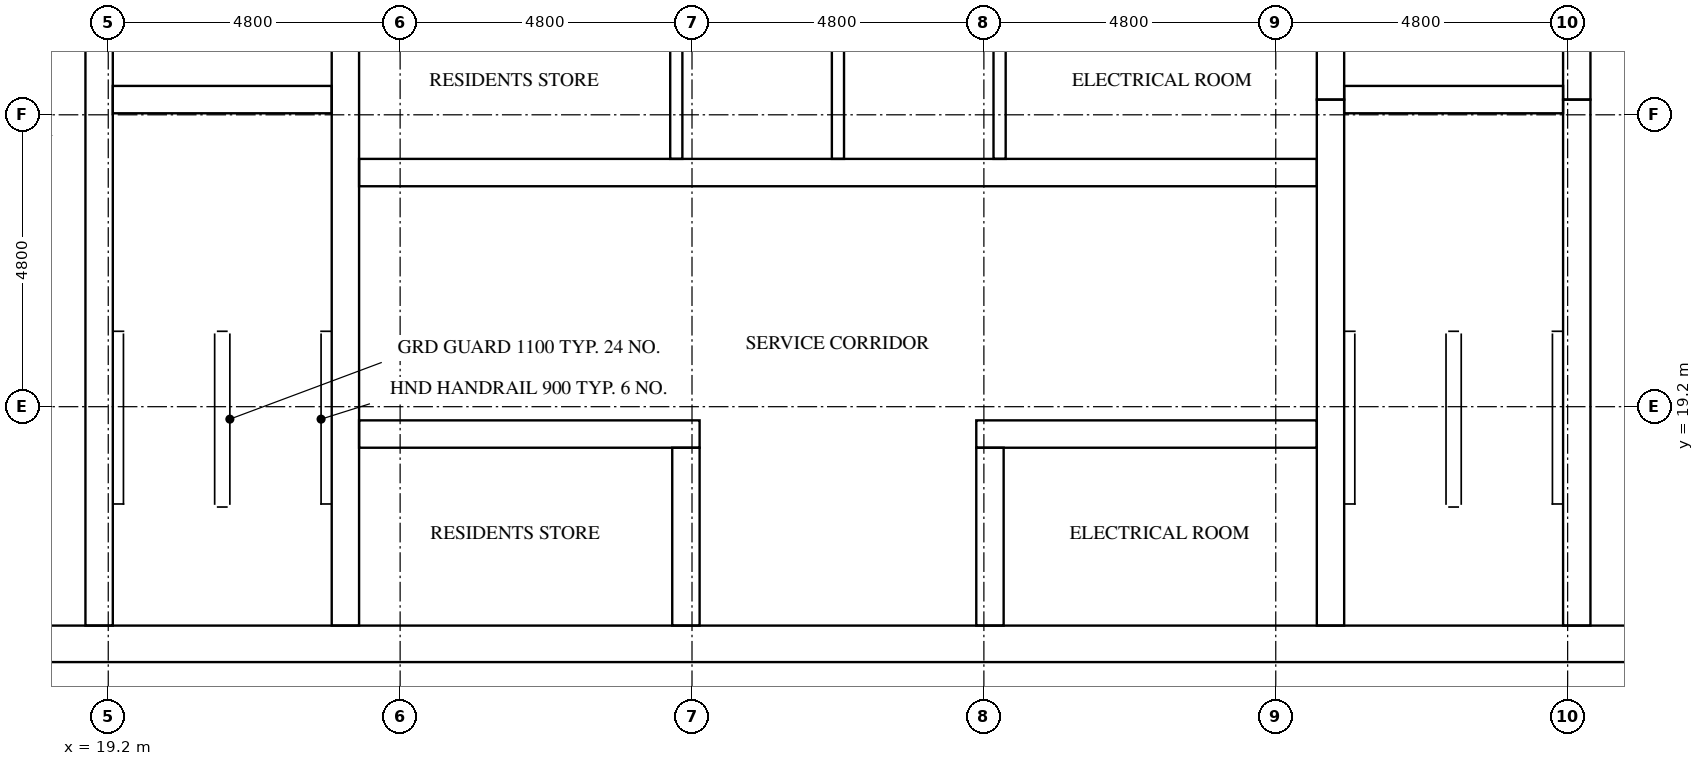
"""IFC4 building model, lengths in metres.
Left out: names, types, materials, properties, quantities, classifications, styles, units other than length and angle.
Written with IfcOpenShell. Run it as: python <this file> out.ifc"""

import sys

from ifc_helpers import new_model, si_unit, direction, frame, frame_2d, origin, place, context, subcontext, project, spatial, rectangle, extrude, element, fill, save


model = new_model("IFC4")
c1 = context("Model", 3, precision=1e-05, world=origin(), true_north=direction((0.0, 1.0)))
c2 = subcontext(c1, "Body", "Model", "MODEL_VIEW")
j1 = project(units=[si_unit("LENGTHUNIT", "METRE"), si_unit("PLANEANGLEUNIT", "RADIAN")], contexts=[c1])
p1 = place(None, origin())
s1 = spatial("IfcSite", under=j1, at=p1, CompositionType="ELEMENT")
p2 = place(p1, origin())
s2 = spatial("IfcBuilding", under=s1, at=p2, CompositionType="ELEMENT")
p3 = place(p2, frame((0.0, 0.0, 252.7)))
s3 = spatial("IfcBuildingStorey", under=s2, at=p3, CompositionType="ELEMENT", Elevation=252.7)
p4 = place(p3, frame((15.0, 15.3, 0.0), z_axis=(0.0, 0.0, 1.0), x_axis=(1.0, 0.0, 0.0)))
e1 = element("IfcWall", 1, at=p4, inside=s3, PredefinedType="SHEAR", context=c2, shape_type="SweptSolid", body=[
    extrude(rectangle(XDim=32.4, YDim=0.6, at=frame_2d((16.2, 0.0))), origin(), (0.0, 0.0, 1.0), 3.2),
])
p5 = place(p4, frame((15.3, 0.0, 0.0)))
e2 = element("IfcOpeningElement", 2, at=p5, cuts=e1, PredefinedType="OPENING", context=c2, shape_type="SweptSolid", body=[
    extrude(rectangle(XDim=1.8, YDim=2.1, at=frame_2d((0.9, 1.05))), frame((0.0, 0.31, 0.0), z_axis=(0.0, -1.0, 0.0), x_axis=(1.0, 0.0, 0.0)), (0.0, 0.0, 1.0), 0.62),
])
p6 = place(p3, frame((19.05, 15.6, 0.0), z_axis=(0.0, 0.0, 1.0), x_axis=(0.0, 1.0, 0.0)))
e3 = element("IfcWall", 3, at=p6, inside=s3, PredefinedType="SHEAR", context=c2, shape_type="SweptSolid", body=[
    extrude(rectangle(XDim=15.425, YDim=0.45, at=frame_2d((7.712, 0.0))), origin(), (0.0, 0.0, 1.0), 3.2),
])
p7 = place(p6, frame((9.85, 0.0, 0.0)))
e4 = element("IfcOpeningElement", 4, at=p7, cuts=e3, PredefinedType="OPENING", context=c2, shape_type="SweptSolid", body=[
    extrude(rectangle(XDim=1.1, YDim=2.1, at=frame_2d((0.55, 1.05))), frame((0.0, 0.235, 0.0), z_axis=(0.0, -1.0, 0.0), x_axis=(1.0, 0.0, 0.0)), (0.0, 0.0, 1.0), 0.47),
])
p8 = place(p6, frame((13.35, 0.0, 0.0)))
e5 = element("IfcOpeningElement", 5, at=p8, cuts=e3, PredefinedType="OPENING", context=c2, shape_type="SweptSolid", body=[
    extrude(rectangle(XDim=1.1, YDim=2.1, at=frame_2d((0.55, 1.05))), frame((0.0, 0.235, 0.0), z_axis=(0.0, -1.0, 0.0), x_axis=(1.0, 0.0, 0.0)), (0.0, 0.0, 1.0), 0.47),
])
p9 = place(p6, frame((0.6, 0.0, 0.0)))
e6 = element("IfcOpeningElement", 6, at=p9, cuts=e3, PredefinedType="OPENING", context=c2, shape_type="SweptSolid", body=[
    extrude(rectangle(XDim=1.2, YDim=2.1, at=frame_2d((0.6, 1.05))), frame((0.0, 0.235, 0.0), z_axis=(0.0, -1.0, 0.0), x_axis=(1.0, 0.0, 0.0)), (0.0, 0.0, 1.0), 0.47),
])
p10 = place(p3, frame((23.1, 15.6, 0.0), z_axis=(0.0, 0.0, 1.0), x_axis=(0.0, 1.0, 0.0)))
e7 = element("IfcWall", 7, at=p10, inside=s3, PredefinedType="SHEAR", context=c2, shape_type="SweptSolid", body=[
    extrude(rectangle(XDim=21.6, YDim=0.45, at=frame_2d((10.8, 0.0))), origin(), (0.0, 0.0, 1.0), 3.2),
])
p11 = place(p3, frame((39.3, 15.6, 0.0), z_axis=(0.0, 0.0, 1.0), x_axis=(0.0, 1.0, 0.0)))
e8 = element("IfcWall", 8, at=p11, inside=s3, PredefinedType="SHEAR", context=c2, shape_type="SweptSolid", body=[
    extrude(rectangle(XDim=8.65, YDim=0.45, at=frame_2d((4.325, 0.0))), origin(), (0.0, 0.0, 1.0), 3.2),
])
p12 = place(p3, frame((39.3, 24.25, 0.0), z_axis=(0.0, 0.0, 1.0), x_axis=(0.0, 1.0, 0.0)))
e9 = element("IfcWall", 9, at=p12, inside=s3, PredefinedType="SHEAR", context=c2, shape_type="SweptSolid", body=[
    extrude(rectangle(XDim=3.5, YDim=0.45, at=frame_2d((1.75, 0.0))), origin(), (0.0, 0.0, 1.0), 3.2),
])
p13 = place(p3, frame((43.35, 15.6, 0.0), z_axis=(0.0, 0.0, 1.0), x_axis=(0.0, 1.0, 0.0)))
e10 = element("IfcWall", 10, at=p13, inside=s3, PredefinedType="SHEAR", context=c2, shape_type="SweptSolid", body=[
    extrude(rectangle(XDim=8.65, YDim=0.45, at=frame_2d((4.325, 0.0))), origin(), (0.0, 0.0, 1.0), 3.2),
])
p14 = place(p13, frame((0.6, 0.0, 0.0)))
e11 = element("IfcOpeningElement", 11, at=p14, cuts=e10, PredefinedType="OPENING", context=c2, shape_type="SweptSolid", body=[
    extrude(rectangle(XDim=1.2, YDim=2.1, at=frame_2d((0.6, 1.05))), frame((0.0, 0.235, 0.0), z_axis=(0.0, -1.0, 0.0), x_axis=(1.0, 0.0, 0.0)), (0.0, 0.0, 1.0), 0.47),
])
p15 = place(p3, frame((43.35, 24.25, 0.0), z_axis=(0.0, 0.0, 1.0), x_axis=(0.0, 1.0, 0.0)))
e12 = element("IfcWall", 12, at=p15, inside=s3, PredefinedType="SHEAR", context=c2, shape_type="SweptSolid", body=[
    extrude(rectangle(XDim=3.5, YDim=0.45, at=frame_2d((1.75, 0.0))), origin(), (0.0, 0.0, 1.0), 3.2),
])
p16 = place(p15, frame((1.2, 0.0, 0.0)))
e13 = element("IfcOpeningElement", 13, at=p16, cuts=e12, PredefinedType="OPENING", context=c2, shape_type="SweptSolid", body=[
    extrude(rectangle(XDim=1.1, YDim=2.1, at=frame_2d((0.55, 1.05))), frame((0.0, 0.235, 0.0), z_axis=(0.0, -1.0, 0.0), x_axis=(1.0, 0.0, 0.0)), (0.0, 0.0, 1.0), 0.47),
])
for number, where, z_axis, x_axis in (
    (14, (19.275, 24.25, 0.0), (0.0, 0.0, 1.0), (1.0, 0.0, 0.0)),
    (15, (39.525, 24.25, 0.0), (0.0, 0.0, 1.0), (1.0, 0.0, 0.0)),
):
    element("IfcWall", number, at=place(p3, frame(where, z_axis=z_axis, x_axis=x_axis)), inside=s3, PredefinedType="SHEAR", context=c2, shape_type="SweptSolid", body=[
        extrude(rectangle(XDim=3.6, YDim=0.45, at=frame_2d((1.8, 0.0))), origin(), (0.0, 0.0, 1.0), 3.2),
    ])
p17 = place(p3, frame((23.325, 18.75, 0.0), z_axis=(0.0, 0.0, 1.0), x_axis=(1.0, 0.0, 0.0)))
e16 = element("IfcWall", 16, at=p17, inside=s3, PredefinedType="SHEAR", context=c2, shape_type="SweptSolid", body=[
    extrude(rectangle(XDim=5.6, YDim=0.45, at=frame_2d((2.8, 0.0))), origin(), (0.0, 0.0, 1.0), 3.2),
])
p18 = place(p17, frame((2.075, 0.0, 0.0)))
e17 = element("IfcOpeningElement", 17, at=p18, cuts=e16, PredefinedType="OPENING", context=c2, shape_type="SweptSolid", body=[
    extrude(rectangle(XDim=1.0, YDim=2.1, at=frame_2d((0.5, 1.05))), frame((0.0, 0.235, 0.0), z_axis=(0.0, -1.0, 0.0), x_axis=(1.0, 0.0, 0.0)), (0.0, 0.0, 1.0), 0.47),
])
p19 = place(p3, frame((33.475, 18.75, 0.0), z_axis=(0.0, 0.0, 1.0), x_axis=(1.0, 0.0, 0.0)))
e18 = element("IfcWall", 18, at=p19, inside=s3, PredefinedType="SHEAR", context=c2, shape_type="SweptSolid", body=[
    extrude(rectangle(XDim=5.6, YDim=0.45, at=frame_2d((2.8, 0.0))), origin(), (0.0, 0.0, 1.0), 3.2),
])
p20 = place(p19, frame((2.525, 0.0, 0.0)))
e19 = element("IfcOpeningElement", 19, at=p20, cuts=e18, PredefinedType="OPENING", context=c2, shape_type="SweptSolid", body=[
    extrude(rectangle(XDim=1.0, YDim=2.1, at=frame_2d((0.5, 1.05))), frame((0.0, 0.235, 0.0), z_axis=(0.0, -1.0, 0.0), x_axis=(1.0, 0.0, 0.0)), (0.0, 0.0, 1.0), 0.47),
])
p21 = place(p3, frame((23.325, 23.05, 0.0), z_axis=(0.0, 0.0, 1.0), x_axis=(1.0, 0.0, 0.0)))
e20 = element("IfcWall", 20, at=p21, inside=s3, PredefinedType="SHEAR", context=c2, shape_type="SweptSolid", body=[
    extrude(rectangle(XDim=15.75, YDim=0.45, at=frame_2d((7.875, 0.0))), origin(), (0.0, 0.0, 1.0), 3.2),
])
p22 = place(p21, frame((2.058, 0.0, 0.0)))
e21 = element("IfcOpeningElement", 21, at=p22, cuts=e20, PredefinedType="OPENING", context=c2, shape_type="SweptSolid", body=[
    extrude(rectangle(XDim=1.0, YDim=2.1, at=frame_2d((0.5, 1.05))), frame((0.0, 0.235, 0.0), z_axis=(0.0, -1.0, 0.0), x_axis=(1.0, 0.0, 0.0)), (0.0, 0.0, 1.0), 0.47),
])
p23 = place(p21, frame((12.692, 0.0, 0.0)))
e22 = element("IfcOpeningElement", 22, at=p23, cuts=e20, PredefinedType="OPENING", context=c2, shape_type="SweptSolid", body=[
    extrude(rectangle(XDim=1.0, YDim=2.1, at=frame_2d((0.5, 1.05))), frame((0.0, 0.235, 0.0), z_axis=(0.0, -1.0, 0.0), x_axis=(1.0, 0.0, 0.0)), (0.0, 0.0, 1.0), 0.47),
])
for number, where, z_axis, x_axis in (
    (23, (28.7, 15.6, 0.0), (0.0, 0.0, 1.0), (0.0, 1.0, 0.0)),
    (24, (33.7, 15.6, 0.0), (0.0, 0.0, 1.0), (0.0, 1.0, 0.0)),
):
    element("IfcWall", number, at=place(p3, frame(where, z_axis=z_axis, x_axis=x_axis)), inside=s3, PredefinedType="SHEAR", context=c2, shape_type="SweptSolid", body=[
        extrude(rectangle(XDim=2.925, YDim=0.45, at=frame_2d((1.462, 0.0))), origin(), (0.0, 0.0, 1.0), 3.2),
    ])
for number, where, z_axis, x_axis in (
    (25, (28.542, 23.275, 0.0), (0.0, 0.0, 1.0), (0.0, 1.0, 0.0)),
    (26, (31.2, 23.275, 0.0), (0.0, 0.0, 1.0), (0.0, 1.0, 0.0)),
    (27, (33.858, 23.275, 0.0), (0.0, 0.0, 1.0), (0.0, 1.0, 0.0)),
):
    element("IfcWall", number, at=place(p3, frame(where, z_axis=z_axis, x_axis=x_axis)), inside=s3, PredefinedType="SOLIDWALL", context=c2, shape_type="SweptSolid", body=[
        extrude(rectangle(XDim=2.65, YDim=0.2, at=frame_2d((1.325, 0.0))), origin(), (0.0, 0.0, 1.0), 3.2),
    ])
p24 = place(p9, frame((1.2, 0.0, 0.0), z_axis=(0.0, 0.0, 1.0), x_axis=(-1.0, 0.0, 0.0)))
e28 = element("IfcDoor", 28, at=p24, inside=s3, OperationType="SINGLE_SWING_RIGHT", PredefinedType="DOOR", context=c2, shape_type="SweptSolid", body=[
    extrude(rectangle(XDim=1.2, YDim=2.1, at=frame_2d((0.6, 1.05))), frame((0.0, 0.025, 0.0), z_axis=(0.0, -1.0, 0.0), x_axis=(1.0, 0.0, 0.0)), (0.0, 0.0, 1.0), 0.05),
])
fill(e6, e28)
p25 = place(p14, origin())
e29 = element("IfcDoor", 29, at=p25, inside=s3, OperationType="SINGLE_SWING_LEFT", PredefinedType="DOOR", context=c2, shape_type="SweptSolid", body=[
    extrude(rectangle(XDim=1.2, YDim=2.1, at=frame_2d((0.6, 1.05))), frame((0.0, 0.025, 0.0), z_axis=(0.0, -1.0, 0.0), x_axis=(1.0, 0.0, 0.0)), (0.0, 0.0, 1.0), 0.05),
])
fill(e11, e29)
p26 = place(p5, frame((1.8, 0.0, 0.0), z_axis=(0.0, 0.0, 1.0), x_axis=(-1.0, 0.0, 0.0)))
e30 = element("IfcDoor", 30, at=p26, inside=s3, OperationType="DOUBLE_DOOR_SINGLE_SWING", PredefinedType="DOOR", context=c2, shape_type="SweptSolid", body=[
    extrude(rectangle(XDim=1.8, YDim=2.1, at=frame_2d((0.9, 1.05))), frame((0.0, 0.025, 0.0), z_axis=(0.0, -1.0, 0.0), x_axis=(1.0, 0.0, 0.0)), (0.0, 0.0, 1.0), 0.05),
])
fill(e2, e30)
p27 = place(p22, frame((1.0, 0.0, 0.0), z_axis=(0.0, 0.0, 1.0), x_axis=(-1.0, 0.0, 0.0)))
e31 = element("IfcDoor", 31, at=p27, inside=s3, OperationType="SINGLE_SWING_LEFT", PredefinedType="DOOR", context=c2, shape_type="SweptSolid", body=[
    extrude(rectangle(XDim=1.0, YDim=2.1, at=frame_2d((0.5, 1.05))), frame((0.0, 0.025, 0.0), z_axis=(0.0, -1.0, 0.0), x_axis=(1.0, 0.0, 0.0)), (0.0, 0.0, 1.0), 0.05),
])
fill(e21, e31)
p28 = place(p23, frame((1.0, 0.0, 0.0), z_axis=(0.0, 0.0, 1.0), x_axis=(-1.0, 0.0, 0.0)))
e32 = element("IfcDoor", 32, at=p28, inside=s3, OperationType="SINGLE_SWING_RIGHT", PredefinedType="DOOR", context=c2, shape_type="SweptSolid", body=[
    extrude(rectangle(XDim=1.0, YDim=2.1, at=frame_2d((0.5, 1.05))), frame((0.0, 0.025, 0.0), z_axis=(0.0, -1.0, 0.0), x_axis=(1.0, 0.0, 0.0)), (0.0, 0.0, 1.0), 0.05),
])
fill(e22, e32)
p29 = place(p18, origin())
e33 = element("IfcDoor", 33, at=p29, inside=s3, OperationType="SINGLE_SWING_LEFT", PredefinedType="DOOR", context=c2, shape_type="SweptSolid", body=[
    extrude(rectangle(XDim=1.0, YDim=2.1, at=frame_2d((0.5, 1.05))), frame((0.0, 0.025, 0.0), z_axis=(0.0, -1.0, 0.0), x_axis=(1.0, 0.0, 0.0)), (0.0, 0.0, 1.0), 0.05),
])
fill(e17, e33)
p30 = place(p20, origin())
e34 = element("IfcDoor", 34, at=p30, inside=s3, OperationType="SINGLE_SWING_RIGHT", PredefinedType="DOOR", context=c2, shape_type="SweptSolid", body=[
    extrude(rectangle(XDim=1.0, YDim=2.1, at=frame_2d((0.5, 1.05))), frame((0.0, 0.025, 0.0), z_axis=(0.0, -1.0, 0.0), x_axis=(1.0, 0.0, 0.0)), (0.0, 0.0, 1.0), 0.05),
])
fill(e19, e34)
save(model, sys.argv[1])
